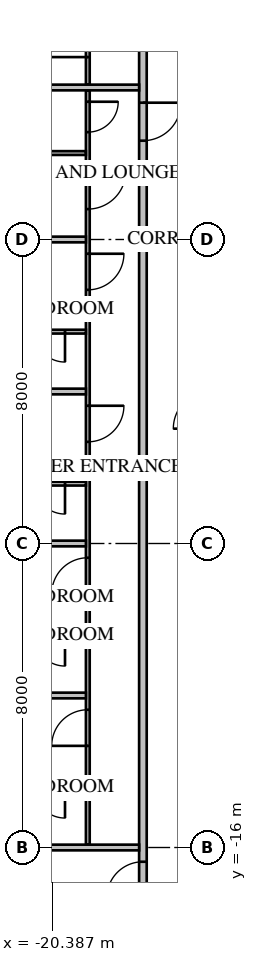
"""IFC4 building model, lengths in metres.
Left out: names, types, materials, properties, quantities, classifications, styles, units other than length and angle.
Written with IfcOpenShell. Run it as: python <this file> out.ifc"""

import sys

from ifc_helpers import new_model, si_unit, direction, frame, frame_2d, origin, place, context, subcontext, project, spatial, rectangle, extrude, element, fill, save


model = new_model("IFC4")
c1 = context("Model", 3, precision=1e-05, world=origin(), true_north=direction((0.0, 1.0)))
c2 = subcontext(c1, "Body", "Model", "MODEL_VIEW")
j1 = project(units=[si_unit("LENGTHUNIT", "METRE"), si_unit("PLANEANGLEUNIT", "RADIAN")], contexts=[c1])
p1 = place(None, origin())
s1 = spatial("IfcSite", under=j1, at=p1, CompositionType="ELEMENT")
p2 = place(p1, origin())
s2 = spatial("IfcBuilding", under=s1, at=p2, CompositionType="ELEMENT")
p3 = place(p2, frame((0.0, 0.0, 19.85)))
s3 = spatial("IfcBuildingStorey", under=s2, at=p3, CompositionType="ELEMENT", Elevation=19.85)
p4 = place(p3, frame((-18.0, 18.0, 0.0), z_axis=(0.0, 0.0, 1.0), x_axis=(0.0, -1.0, 0.0)))
e1 = element("IfcWall", 1, at=p4, inside=s3, PredefinedType="PARTITIONING", context=c2, shape_type="SweptSolid", body=[
    extrude(rectangle(XDim=36.0, YDim=0.2, at=frame_2d((18.0, 0.0))), origin(), (0.0, 0.0, 1.0), 3.65),
])
p5 = place(p4, frame((10.4, 0.0, 0.0)))
e2 = element("IfcOpeningElement", 2, at=p5, cuts=e1, PredefinedType="OPENING", context=c2, shape_type="SweptSolid", body=[
    extrude(rectangle(XDim=1.0, YDim=2.1, at=frame_2d((0.5, 1.05))), frame((0.0, 0.12, 0.0), z_axis=(0.0, -1.0, 0.0), x_axis=(1.0, 0.0, 0.0)), (0.0, 0.0, 1.0), 0.24),
])
p6 = place(p4, frame((14.4, 0.0, 0.0)))
e3 = element("IfcOpeningElement", 3, at=p6, cuts=e1, PredefinedType="OPENING", context=c2, shape_type="SweptSolid", body=[
    extrude(rectangle(XDim=1.0, YDim=2.1, at=frame_2d((0.5, 1.05))), frame((0.0, 0.12, 0.0), z_axis=(0.0, -1.0, 0.0), x_axis=(1.0, 0.0, 0.0)), (0.0, 0.0, 1.0), 0.24),
])
p7 = place(p4, frame((0.375, 0.0, 0.0)))
e4 = element("IfcOpeningElement", 4, at=p7, cuts=e1, PredefinedType="OPENING", context=c2, shape_type="SweptSolid", body=[
    extrude(rectangle(XDim=1.0, YDim=2.1, at=frame_2d((0.5, 1.05))), frame((0.0, 0.12, 0.0), z_axis=(0.0, -1.0, 0.0), x_axis=(1.0, 0.0, 0.0)), (0.0, 0.0, 1.0), 0.24),
])
p8 = place(p4, frame((34.375, 0.0, 0.0)))
e5 = element("IfcOpeningElement", 5, at=p8, cuts=e1, PredefinedType="OPENING", context=c2, shape_type="SweptSolid", body=[
    extrude(rectangle(XDim=0.95, YDim=2.1, at=frame_2d((0.475, 1.05))), frame((0.0, 0.12, 0.0), z_axis=(0.0, -1.0, 0.0), x_axis=(1.0, 0.0, 0.0)), (0.0, 0.0, 1.0), 0.24),
])
p9 = place(p3, frame((-19.45, 15.925, 0.0), z_axis=(0.0, 0.0, 1.0), x_axis=(0.0, -1.0, 0.0)))
e6 = element("IfcWall", 6, at=p9, inside=s3, PredefinedType="PARTITIONING", context=c2, shape_type="SweptSolid", body=[
    extrude(rectangle(XDim=11.85, YDim=0.1, at=frame_2d((5.925, 0.0))), origin(), (0.0, 0.0, 1.0), 3.65),
])
p10 = place(p9, frame((10.125, 0.0, 0.0)))
e7 = element("IfcOpeningElement", 7, at=p10, cuts=e6, PredefinedType="OPENING", context=c2, shape_type="SweptSolid", body=[
    extrude(rectangle(XDim=1.0, YDim=2.1, at=frame_2d((0.5, 1.05))), frame((0.0, 0.07, 0.0), z_axis=(0.0, -1.0, 0.0), x_axis=(1.0, 0.0, 0.0)), (0.0, 0.0, 1.0), 0.14),
])
p11 = place(p9, frame((8.3, 0.0, 0.0)))
e8 = element("IfcOpeningElement", 8, at=p11, cuts=e6, PredefinedType="OPENING", context=c2, shape_type="SweptSolid", body=[
    extrude(rectangle(XDim=0.8, YDim=2.1, at=frame_2d((0.4, 1.05))), frame((0.0, 0.07, 0.0), z_axis=(0.0, -1.0, 0.0), x_axis=(1.0, 0.0, 0.0)), (0.0, 0.0, 1.0), 0.14),
])
p12 = place(p9, frame((0.3, 0.0, 0.0)))
e9 = element("IfcOpeningElement", 9, at=p12, cuts=e6, PredefinedType="OPENING", context=c2, shape_type="SweptSolid", body=[
    extrude(rectangle(XDim=0.95, YDim=2.1, at=frame_2d((0.475, 1.05))), frame((0.0, 0.07, 0.0), z_axis=(0.0, -1.0, 0.0), x_axis=(1.0, 0.0, 0.0)), (0.0, 0.0, 1.0), 0.14),
])
p13 = place(p9, frame((4.3, 0.0, 0.0)))
e10 = element("IfcOpeningElement", 10, at=p13, cuts=e6, PredefinedType="OPENING", context=c2, shape_type="SweptSolid", body=[
    extrude(rectangle(XDim=0.95, YDim=2.1, at=frame_2d((0.475, 1.05))), frame((0.0, 0.07, 0.0), z_axis=(0.0, -1.0, 0.0), x_axis=(1.0, 0.0, 0.0)), (0.0, 0.0, 1.0), 0.14),
])
p14 = place(p3, frame((-19.45, 3.925, 0.0), z_axis=(0.0, 0.0, 1.0), x_axis=(0.0, -1.0, 0.0)))
e11 = element("IfcWall", 11, at=p14, inside=s3, PredefinedType="PARTITIONING", context=c2, shape_type="SweptSolid", body=[
    extrude(rectangle(XDim=19.85, YDim=0.1, at=frame_2d((9.925, 0.0))), origin(), (0.0, 0.0, 1.0), 3.65),
])
p15 = place(p14, frame((2.125, 0.0, 0.0)))
e12 = element("IfcOpeningElement", 12, at=p15, cuts=e11, PredefinedType="OPENING", context=c2, shape_type="SweptSolid", body=[
    extrude(rectangle(XDim=1.0, YDim=2.1, at=frame_2d((0.5, 1.05))), frame((0.0, 0.07, 0.0), z_axis=(0.0, -1.0, 0.0), x_axis=(1.0, 0.0, 0.0)), (0.0, 0.0, 1.0), 0.14),
])
p16 = place(p14, frame((0.3, 0.0, 0.0)))
e13 = element("IfcOpeningElement", 13, at=p16, cuts=e11, PredefinedType="OPENING", context=c2, shape_type="SweptSolid", body=[
    extrude(rectangle(XDim=0.8, YDim=2.1, at=frame_2d((0.4, 1.05))), frame((0.0, 0.07, 0.0), z_axis=(0.0, -1.0, 0.0), x_axis=(1.0, 0.0, 0.0)), (0.0, 0.0, 1.0), 0.14),
])
p17 = place(p14, frame((4.3, 0.0, 0.0)))
e14 = element("IfcOpeningElement", 14, at=p17, cuts=e11, PredefinedType="OPENING", context=c2, shape_type="SweptSolid", body=[
    extrude(rectangle(XDim=0.95, YDim=2.1, at=frame_2d((0.475, 1.05))), frame((0.0, 0.07, 0.0), z_axis=(0.0, -1.0, 0.0), x_axis=(1.0, 0.0, 0.0)), (0.0, 0.0, 1.0), 0.14),
])
p18 = place(p14, frame((8.3, 0.0, 0.0)))
e15 = element("IfcOpeningElement", 15, at=p18, cuts=e11, PredefinedType="OPENING", context=c2, shape_type="SweptSolid", body=[
    extrude(rectangle(XDim=0.95, YDim=2.1, at=frame_2d((0.475, 1.05))), frame((0.0, 0.07, 0.0), z_axis=(0.0, -1.0, 0.0), x_axis=(1.0, 0.0, 0.0)), (0.0, 0.0, 1.0), 0.14),
])
p19 = place(p14, frame((12.3, 0.0, 0.0)))
e16 = element("IfcOpeningElement", 16, at=p19, cuts=e11, PredefinedType="OPENING", context=c2, shape_type="SweptSolid", body=[
    extrude(rectangle(XDim=0.95, YDim=2.1, at=frame_2d((0.475, 1.05))), frame((0.0, 0.07, 0.0), z_axis=(0.0, -1.0, 0.0), x_axis=(1.0, 0.0, 0.0)), (0.0, 0.0, 1.0), 0.14),
])
p20 = place(p14, frame((16.3, 0.0, 0.0)))
e17 = element("IfcOpeningElement", 17, at=p20, cuts=e11, PredefinedType="OPENING", context=c2, shape_type="SweptSolid", body=[
    extrude(rectangle(XDim=0.95, YDim=2.1, at=frame_2d((0.475, 1.05))), frame((0.0, 0.07, 0.0), z_axis=(0.0, -1.0, 0.0), x_axis=(1.0, 0.0, 0.0)), (0.0, 0.0, 1.0), 0.14),
])
p21 = place(p3, frame((-19.5, 2.275, 0.0), z_axis=(0.0, 0.0, 1.0), x_axis=(-1.0, 0.0, 0.0)))
e18 = element("IfcWall", 18, at=p21, inside=s3, PredefinedType="PARTITIONING", context=c2, shape_type="SweptSolid", body=[
    extrude(rectangle(XDim=2.1, YDim=0.1, at=frame_2d((1.05, 0.0))), origin(), (0.0, 0.0, 1.0), 3.65),
])
p22 = place(p3, frame((-18.1, 4.0, 0.0), z_axis=(0.0, 0.0, 1.0), x_axis=(-1.0, 0.0, 0.0)))
e19 = element("IfcWall", 19, at=p22, inside=s3, PredefinedType="PARTITIONING", context=c2, shape_type="SweptSolid", body=[
    extrude(rectangle(XDim=6.6, YDim=0.15, at=frame_2d((3.3, 0.0))), origin(), (0.0, 0.0, 1.0), 3.65),
])
p23 = place(p3, frame((-19.5, 0.0, 0.0), z_axis=(0.0, 0.0, 1.0), x_axis=(-1.0, 0.0, 0.0)))
e20 = element("IfcWall", 20, at=p23, inside=s3, PredefinedType="PARTITIONING", context=c2, shape_type="SweptSolid", body=[
    extrude(rectangle(XDim=5.2, YDim=0.15, at=frame_2d((2.6, 0.0))), origin(), (0.0, 0.0, 1.0), 2.957),
])
for number, where, z_axis, x_axis in (
    (21, (-19.5, -4.0, 0.0), (0.0, 0.0, 1.0), (-1.0, 0.0, 0.0)),
    (22, (-19.5, -8.0, 0.0), (0.0, 0.0, 1.0), (-1.0, 0.0, 0.0)),
    (23, (-19.5, -12.0, 0.0), (0.0, 0.0, 1.0), (-1.0, 0.0, 0.0)),
):
    element("IfcWall", number, at=place(p3, frame(where, z_axis=z_axis, x_axis=x_axis)), inside=s3, PredefinedType="PARTITIONING", context=c2, shape_type="SweptSolid", body=[
        extrude(rectangle(XDim=5.2, YDim=0.15, at=frame_2d((2.6, 0.0))), origin(), (0.0, 0.0, 1.0), 3.65),
    ])
p24 = place(p3, frame((-18.1, -16.0, 0.0), z_axis=(0.0, 0.0, 1.0), x_axis=(-1.0, 0.0, 0.0)))
e24 = element("IfcWall", 24, at=p24, inside=s3, PredefinedType="PARTITIONING", context=c2, shape_type="SweptSolid", body=[
    extrude(rectangle(XDim=6.589, YDim=0.15, at=frame_2d((3.295, 0.0))), origin(), (0.0, 0.0, 1.0), 3.65),
])
p25 = place(p3, frame((-19.5, -2.425, 0.0), z_axis=(0.0, 0.0, 1.0), x_axis=(-1.0, 0.0, 0.0)))
e25 = element("IfcWall", 25, at=p25, inside=s3, PredefinedType="PARTITIONING", context=c2, shape_type="SweptSolid", body=[
    extrude(rectangle(XDim=2.7, YDim=0.1, at=frame_2d((1.35, 0.0))), origin(), (0.0, 0.0, 1.0), 3.65),
])
p26 = place(p25, frame((0.55, 0.0, 0.0)))
e26 = element("IfcOpeningElement", 26, at=p26, cuts=e25, PredefinedType="OPENING", context=c2, shape_type="SweptSolid", body=[
    extrude(rectangle(XDim=0.8, YDim=2.1, at=frame_2d((0.4, 1.05))), frame((0.0, 0.07, 0.0), z_axis=(0.0, -1.0, 0.0), x_axis=(1.0, 0.0, 0.0)), (0.0, 0.0, 1.0), 0.14),
])
p27 = place(p3, frame((-19.5, -6.425, 0.0), z_axis=(0.0, 0.0, 1.0), x_axis=(-1.0, 0.0, 0.0)))
e27 = element("IfcWall", 27, at=p27, inside=s3, PredefinedType="PARTITIONING", context=c2, shape_type="SweptSolid", body=[
    extrude(rectangle(XDim=2.7, YDim=0.1, at=frame_2d((1.35, 0.0))), origin(), (0.0, 0.0, 1.0), 3.65),
])
p28 = place(p27, frame((0.55, 0.0, 0.0)))
e28 = element("IfcOpeningElement", 28, at=p28, cuts=e27, PredefinedType="OPENING", context=c2, shape_type="SweptSolid", body=[
    extrude(rectangle(XDim=0.8, YDim=2.1, at=frame_2d((0.4, 1.05))), frame((0.0, 0.07, 0.0), z_axis=(0.0, -1.0, 0.0), x_axis=(1.0, 0.0, 0.0)), (0.0, 0.0, 1.0), 0.14),
])
p29 = place(p3, frame((-19.5, -10.425, 0.0), z_axis=(0.0, 0.0, 1.0), x_axis=(-1.0, 0.0, 0.0)))
e29 = element("IfcWall", 29, at=p29, inside=s3, PredefinedType="PARTITIONING", context=c2, shape_type="SweptSolid", body=[
    extrude(rectangle(XDim=2.7, YDim=0.1, at=frame_2d((1.35, 0.0))), origin(), (0.0, 0.0, 1.0), 3.65),
])
p30 = place(p29, frame((0.55, 0.0, 0.0)))
e30 = element("IfcOpeningElement", 30, at=p30, cuts=e29, PredefinedType="OPENING", context=c2, shape_type="SweptSolid", body=[
    extrude(rectangle(XDim=0.8, YDim=2.1, at=frame_2d((0.4, 1.05))), frame((0.0, 0.07, 0.0), z_axis=(0.0, -1.0, 0.0), x_axis=(1.0, 0.0, 0.0)), (0.0, 0.0, 1.0), 0.14),
])
p31 = place(p3, frame((-19.5, -14.425, 0.0), z_axis=(0.0, 0.0, 1.0), x_axis=(-1.0, 0.0, 0.0)))
e31 = element("IfcWall", 31, at=p31, inside=s3, PredefinedType="PARTITIONING", context=c2, shape_type="SweptSolid", body=[
    extrude(rectangle(XDim=2.7, YDim=0.1, at=frame_2d((1.35, 0.0))), origin(), (0.0, 0.0, 1.0), 3.65),
])
p32 = place(p31, frame((0.55, 0.0, 0.0)))
e32 = element("IfcOpeningElement", 32, at=p32, cuts=e31, PredefinedType="OPENING", context=c2, shape_type="SweptSolid", body=[
    extrude(rectangle(XDim=0.8, YDim=2.1, at=frame_2d((0.4, 1.05))), frame((0.0, 0.07, 0.0), z_axis=(0.0, -1.0, 0.0), x_axis=(1.0, 0.0, 0.0)), (0.0, 0.0, 1.0), 0.14),
])
p33 = place(p10, origin())
e33 = element("IfcDoor", 33, at=p33, inside=s3, OperationType="SINGLE_SWING_RIGHT", PredefinedType="DOOR", context=c2, shape_type="SweptSolid", body=[
    extrude(rectangle(XDim=1.0, YDim=2.1, at=frame_2d((0.5, 1.05))), frame((0.0, 0.025, 0.0), z_axis=(0.0, -1.0, 0.0), x_axis=(1.0, 0.0, 0.0)), (0.0, 0.0, 1.0), 0.05),
])
fill(e7, e33)
p34 = place(p6, origin())
e34 = element("IfcDoor", 34, at=p34, inside=s3, OperationType="SINGLE_SWING_LEFT", PredefinedType="DOOR", context=c2, shape_type="SweptSolid", body=[
    extrude(rectangle(XDim=1.0, YDim=2.1, at=frame_2d((0.5, 1.05))), frame((0.0, 0.025, 0.0), z_axis=(0.0, -1.0, 0.0), x_axis=(1.0, 0.0, 0.0)), (0.0, 0.0, 1.0), 0.05),
])
fill(e3, e34)
p35 = place(p15, origin())
e35 = element("IfcDoor", 35, at=p35, inside=s3, OperationType="SINGLE_SWING_LEFT", PredefinedType="DOOR", context=c2, shape_type="SweptSolid", body=[
    extrude(rectangle(XDim=1.0, YDim=2.1, at=frame_2d((0.5, 1.05))), frame((0.0, 0.025, 0.0), z_axis=(0.0, -1.0, 0.0), x_axis=(1.0, 0.0, 0.0)), (0.0, 0.0, 1.0), 0.05),
])
fill(e12, e35)
p36 = place(p16, origin())
e36 = element("IfcDoor", 36, at=p36, inside=s3, OperationType="SINGLE_SWING_LEFT", PredefinedType="DOOR", context=c2, shape_type="SweptSolid", body=[
    extrude(rectangle(XDim=0.8, YDim=2.1, at=frame_2d((0.4, 1.05))), frame((0.0, 0.025, 0.0), z_axis=(0.0, -1.0, 0.0), x_axis=(1.0, 0.0, 0.0)), (0.0, 0.0, 1.0), 0.05),
])
fill(e13, e36)
p37 = place(p17, origin())
e37 = element("IfcDoor", 37, at=p37, inside=s3, OperationType="SINGLE_SWING_LEFT", PredefinedType="DOOR", context=c2, shape_type="SweptSolid", body=[
    extrude(rectangle(XDim=0.95, YDim=2.1, at=frame_2d((0.475, 1.05))), frame((0.0, 0.025, 0.0), z_axis=(0.0, -1.0, 0.0), x_axis=(1.0, 0.0, 0.0)), (0.0, 0.0, 1.0), 0.05),
])
fill(e14, e37)
p38 = place(p26, origin())
e38 = element("IfcDoor", 38, at=p38, inside=s3, OperationType="SINGLE_SWING_LEFT", PredefinedType="DOOR", context=c2, shape_type="SweptSolid", body=[
    extrude(rectangle(XDim=0.8, YDim=2.1, at=frame_2d((0.4, 1.05))), frame((0.0, 0.025, 0.0), z_axis=(0.0, -1.0, 0.0), x_axis=(1.0, 0.0, 0.0)), (0.0, 0.0, 1.0), 0.05),
])
fill(e26, e38)
p39 = place(p18, origin())
e39 = element("IfcDoor", 39, at=p39, inside=s3, OperationType="SINGLE_SWING_LEFT", PredefinedType="DOOR", context=c2, shape_type="SweptSolid", body=[
    extrude(rectangle(XDim=0.95, YDim=2.1, at=frame_2d((0.475, 1.05))), frame((0.0, 0.025, 0.0), z_axis=(0.0, -1.0, 0.0), x_axis=(1.0, 0.0, 0.0)), (0.0, 0.0, 1.0), 0.05),
])
fill(e15, e39)
p40 = place(p28, origin())
e40 = element("IfcDoor", 40, at=p40, inside=s3, OperationType="SINGLE_SWING_LEFT", PredefinedType="DOOR", context=c2, shape_type="SweptSolid", body=[
    extrude(rectangle(XDim=0.8, YDim=2.1, at=frame_2d((0.4, 1.05))), frame((0.0, 0.025, 0.0), z_axis=(0.0, -1.0, 0.0), x_axis=(1.0, 0.0, 0.0)), (0.0, 0.0, 1.0), 0.05),
])
fill(e28, e40)
p41 = place(p19, origin())
e41 = element("IfcDoor", 41, at=p41, inside=s3, OperationType="SINGLE_SWING_RIGHT", PredefinedType="DOOR", context=c2, shape_type="SweptSolid", body=[
    extrude(rectangle(XDim=0.95, YDim=2.1, at=frame_2d((0.475, 1.05))), frame((0.0, 0.025, 0.0), z_axis=(0.0, -1.0, 0.0), x_axis=(1.0, 0.0, 0.0)), (0.0, 0.0, 1.0), 0.05),
])
fill(e16, e41)
p42 = place(p30, origin())
e42 = element("IfcDoor", 42, at=p42, inside=s3, OperationType="SINGLE_SWING_LEFT", PredefinedType="DOOR", context=c2, shape_type="SweptSolid", body=[
    extrude(rectangle(XDim=0.8, YDim=2.1, at=frame_2d((0.4, 1.05))), frame((0.0, 0.025, 0.0), z_axis=(0.0, -1.0, 0.0), x_axis=(1.0, 0.0, 0.0)), (0.0, 0.0, 1.0), 0.05),
])
fill(e30, e42)
p43 = place(p20, origin())
e43 = element("IfcDoor", 43, at=p43, inside=s3, OperationType="SINGLE_SWING_RIGHT", PredefinedType="DOOR", context=c2, shape_type="SweptSolid", body=[
    extrude(rectangle(XDim=0.95, YDim=2.1, at=frame_2d((0.475, 1.05))), frame((0.0, 0.025, 0.0), z_axis=(0.0, -1.0, 0.0), x_axis=(1.0, 0.0, 0.0)), (0.0, 0.0, 1.0), 0.05),
])
fill(e17, e43)
p44 = place(p32, origin())
e44 = element("IfcDoor", 44, at=p44, inside=s3, OperationType="SINGLE_SWING_LEFT", PredefinedType="DOOR", context=c2, shape_type="SweptSolid", body=[
    extrude(rectangle(XDim=0.8, YDim=2.1, at=frame_2d((0.4, 1.05))), frame((0.0, 0.025, 0.0), z_axis=(0.0, -1.0, 0.0), x_axis=(1.0, 0.0, 0.0)), (0.0, 0.0, 1.0), 0.05),
])
fill(e32, e44)
p45 = place(p8, origin())
e45 = element("IfcDoor", 45, at=p45, inside=s3, OperationType="SINGLE_SWING_RIGHT", PredefinedType="DOOR", context=c2, shape_type="SweptSolid", body=[
    extrude(rectangle(XDim=0.95, YDim=2.1, at=frame_2d((0.475, 1.05))), frame((0.0, 0.025, 0.0), z_axis=(0.0, -1.0, 0.0), x_axis=(1.0, 0.0, 0.0)), (0.0, 0.0, 1.0), 0.05),
])
fill(e5, e45)
save(model, sys.argv[1])
